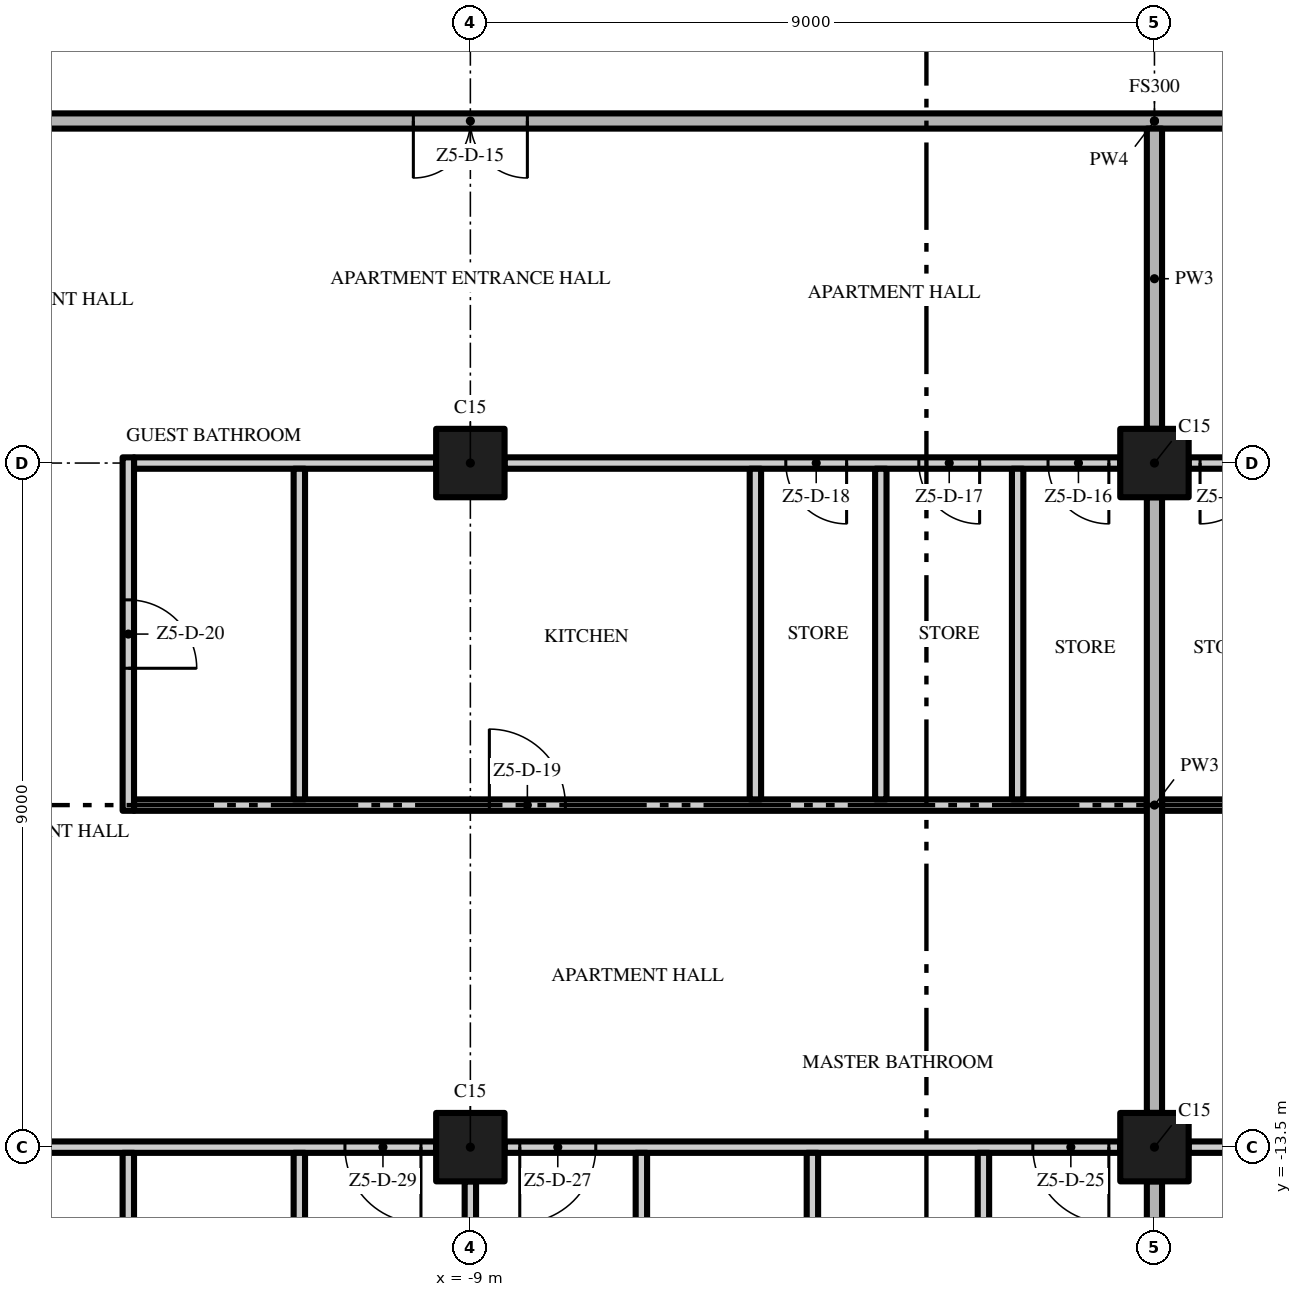
"""IFC4 building model, lengths in metres.
Left out: names, types, materials, properties, quantities, classifications, styles, units other than length and angle.
Written with IfcOpenShell. Run it as: python <this file> out.ifc"""

import sys

from ifc_helpers import new_model, si_unit, direction, frame, frame_2d, origin, origin_2d, place, context, subcontext, project, spatial, rectangle, extrude, element, fill, save


model = new_model("IFC4")
c1 = context("Model", 3, precision=1e-05, world=origin(), true_north=direction((0.0, 1.0)))
c2 = subcontext(c1, "Body", "Model", "MODEL_VIEW")
j1 = project(units=[si_unit("LENGTHUNIT", "METRE"), si_unit("PLANEANGLEUNIT", "RADIAN")], contexts=[c1])
p1 = place(None, origin())
s1 = spatial("IfcSite", under=j1, at=p1, CompositionType="ELEMENT")
p2 = place(p1, origin())
s2 = spatial("IfcBuilding", under=s1, at=p2, CompositionType="ELEMENT")
p3 = place(p2, frame((0.0, 0.0, 280.6)))
s3 = spatial("IfcBuildingStorey", under=s2, at=p3, CompositionType="ELEMENT", Elevation=280.6)
for number, where, z_axis, x_axis in (
    (1, (-9.0, -13.5, 0.0), (0.0, 0.0, 1.0), (1.0, 0.0, 0.0)),
    (2, (-9.0, -4.5, 0.0), (0.0, 0.0, 1.0), (1.0, 0.0, 0.0)),
    (3, (0.0, -13.5, 0.0), (0.0, 0.0, 1.0), (1.0, 0.0, 0.0)),
    (4, (0.0, -4.5, 0.0), (0.0, 0.0, 1.0), (1.0, 0.0, 0.0)),
):
    element("IfcColumn", number, at=place(p3, frame(where, z_axis=z_axis, x_axis=x_axis)), inside=s3, PredefinedType="COLUMN", context=c2, shape_type="SweptSolid", body=[
        extrude(rectangle(XDim=0.9, YDim=0.9, at=origin_2d()), origin(), (0.0, 0.0, 1.0), 3.5),
    ])
p4 = place(p3, frame((-9.45, -13.5, 0.0), z_axis=(0.0, 0.0, 1.0), x_axis=(-1.0, 0.0, 0.0)))
e5 = element("IfcWall", 5, at=p4, inside=s3, PredefinedType="PARTITIONING", context=c2, shape_type="SweptSolid", body=[
    extrude(rectangle(XDim=8.1, YDim=0.15, at=frame_2d((4.05, 0.0))), origin(), (0.0, 0.0, 1.0), 3.5),
])
p5 = place(p4, frame((0.2, 0.0, 0.0)))
e6 = element("IfcOpeningElement", 6, at=p5, cuts=e5, PredefinedType="OPENING", context=c2, shape_type="SweptSolid", body=[
    extrude(rectangle(XDim=1.0, YDim=2.4, at=frame_2d((0.5, 1.2))), frame((0.0, 0.085, 0.0), z_axis=(0.0, -1.0, 0.0), x_axis=(1.0, 0.0, 0.0)), (0.0, 0.0, 1.0), 0.17),
])
p6 = place(p4, frame((5.8, 0.0, 0.0)))
e7 = element("IfcOpeningElement", 7, at=p6, cuts=e5, PredefinedType="OPENING", context=c2, shape_type="SweptSolid", body=[
    extrude(rectangle(XDim=1.0, YDim=2.4, at=frame_2d((0.5, 1.2))), frame((0.0, 0.085, 0.0), z_axis=(0.0, -1.0, 0.0), x_axis=(1.0, 0.0, 0.0)), (0.0, 0.0, 1.0), 0.17),
])
p7 = place(p3, frame((-0.45, -13.5, 0.0), z_axis=(0.0, 0.0, 1.0), x_axis=(-1.0, 0.0, 0.0)))
e8 = element("IfcWall", 8, at=p7, inside=s3, PredefinedType="PARTITIONING", context=c2, shape_type="SweptSolid", body=[
    extrude(rectangle(XDim=8.1, YDim=0.15, at=frame_2d((4.05, 0.0))), origin(), (0.0, 0.0, 1.0), 3.5),
])
p8 = place(p7, frame((0.15, 0.0, 0.0)))
e9 = element("IfcOpeningElement", 9, at=p8, cuts=e8, PredefinedType="OPENING", context=c2, shape_type="SweptSolid", body=[
    extrude(rectangle(XDim=1.0, YDim=2.4, at=frame_2d((0.5, 1.2))), frame((0.0, 0.085, 0.0), z_axis=(0.0, -1.0, 0.0), x_axis=(1.0, 0.0, 0.0)), (0.0, 0.0, 1.0), 0.17),
])
p9 = place(p7, frame((6.9, 0.0, 0.0)))
e10 = element("IfcOpeningElement", 10, at=p9, cuts=e8, PredefinedType="OPENING", context=c2, shape_type="SweptSolid", body=[
    extrude(rectangle(XDim=1.0, YDim=2.4, at=frame_2d((0.5, 1.2))), frame((0.0, 0.085, 0.0), z_axis=(0.0, -1.0, 0.0), x_axis=(1.0, 0.0, 0.0)), (0.0, 0.0, 1.0), 0.17),
])
p10 = place(p3, frame((8.55, -13.5, 0.0), z_axis=(0.0, 0.0, 1.0), x_axis=(-1.0, 0.0, 0.0)))
e11 = element("IfcWall", 11, at=p10, inside=s3, PredefinedType="PARTITIONING", context=c2, shape_type="SweptSolid", body=[
    extrude(rectangle(XDim=8.1, YDim=0.15, at=frame_2d((4.05, 0.0))), origin(), (0.0, 0.0, 1.0), 3.5),
])
p11 = place(p10, frame((0.2, 0.0, 0.0)))
e12 = element("IfcOpeningElement", 12, at=p11, cuts=e11, PredefinedType="OPENING", context=c2, shape_type="SweptSolid", body=[
    extrude(rectangle(XDim=1.0, YDim=2.4, at=frame_2d((0.5, 1.2))), frame((0.0, 0.085, 0.0), z_axis=(0.0, -1.0, 0.0), x_axis=(1.0, 0.0, 0.0)), (0.0, 0.0, 1.0), 0.17),
])
p12 = place(p10, frame((5.8, 0.0, 0.0)))
e13 = element("IfcOpeningElement", 13, at=p12, cuts=e11, PredefinedType="OPENING", context=c2, shape_type="SweptSolid", body=[
    extrude(rectangle(XDim=1.0, YDim=2.4, at=frame_2d((0.5, 1.2))), frame((0.0, 0.085, 0.0), z_axis=(0.0, -1.0, 0.0), x_axis=(1.0, 0.0, 0.0)), (0.0, 0.0, 1.0), 0.17),
])
p13 = place(p3, frame((-13.425, -9.0, 0.0), z_axis=(0.0, 0.0, 1.0), x_axis=(1.0, 0.0, 0.0)))
e14 = element("IfcWall", 14, at=p13, inside=s3, PredefinedType="PARTITIONING", context=c2, shape_type="SweptSolid", body=[
    extrude(rectangle(XDim=13.325, YDim=0.15, at=frame_2d((6.662, 0.0))), origin(), (0.0, 0.0, 1.0), 3.5),
])
p14 = place(p13, frame((4.675, 0.0, 0.0)))
e15 = element("IfcOpeningElement", 15, at=p14, cuts=e14, PredefinedType="OPENING", context=c2, shape_type="SweptSolid", body=[
    extrude(rectangle(XDim=1.0, YDim=2.4, at=frame_2d((0.5, 1.2))), frame((0.0, 0.085, 0.0), z_axis=(0.0, -1.0, 0.0), x_axis=(1.0, 0.0, 0.0)), (0.0, 0.0, 1.0), 0.17),
])
p15 = place(p3, frame((0.1, -9.0, 0.0), z_axis=(0.0, 0.0, 1.0), x_axis=(1.0, 0.0, 0.0)))
e16 = element("IfcWall", 16, at=p15, inside=s3, PredefinedType="PARTITIONING", context=c2, shape_type="SweptSolid", body=[
    extrude(rectangle(XDim=13.4, YDim=0.15, at=frame_2d((6.7, 0.0))), origin(), (0.0, 0.0, 1.0), 3.5),
])
p16 = place(p15, frame((11.2, 0.0, 0.0)))
e17 = element("IfcOpeningElement", 17, at=p16, cuts=e16, PredefinedType="OPENING", context=c2, shape_type="SweptSolid", body=[
    extrude(rectangle(XDim=0.8, YDim=2.0, at=frame_2d((0.4, 1.0))), frame((0.0, 0.085, 0.0), z_axis=(0.0, -1.0, 0.0), x_axis=(1.0, 0.0, 0.0)), (0.0, 0.0, 1.0), 0.17),
])
p17 = place(p15, frame((8.55, 0.0, 0.0)))
e18 = element("IfcOpeningElement", 18, at=p17, cuts=e16, PredefinedType="OPENING", context=c2, shape_type="SweptSolid", body=[
    extrude(rectangle(XDim=0.8, YDim=2.0, at=frame_2d((0.4, 1.0))), frame((0.0, 0.085, 0.0), z_axis=(0.0, -1.0, 0.0), x_axis=(1.0, 0.0, 0.0)), (0.0, 0.0, 1.0), 0.17),
])
p18 = place(p15, frame((5.8, 0.0, 0.0)))
e19 = element("IfcOpeningElement", 19, at=p18, cuts=e16, PredefinedType="OPENING", context=c2, shape_type="SweptSolid", body=[
    extrude(rectangle(XDim=0.8, YDim=2.0, at=frame_2d((0.4, 1.0))), frame((0.0, 0.085, 0.0), z_axis=(0.0, -1.0, 0.0), x_axis=(1.0, 0.0, 0.0)), (0.0, 0.0, 1.0), 0.17),
])
p19 = place(p3, frame((-13.425, -4.5, 0.0), z_axis=(0.0, 0.0, 1.0), x_axis=(1.0, 0.0, 0.0)))
e20 = element("IfcWall", 20, at=p19, inside=s3, PredefinedType="PARTITIONING", context=c2, shape_type="SweptSolid", body=[
    extrude(rectangle(XDim=3.975, YDim=0.15, at=frame_2d((1.988, 0.0))), origin(), (0.0, 0.0, 1.0), 3.5),
])
p20 = place(p3, frame((-0.45, -4.5, 0.0), z_axis=(0.0, 0.0, 1.0), x_axis=(-1.0, 0.0, 0.0)))
e21 = element("IfcWall", 21, at=p20, inside=s3, PredefinedType="PARTITIONING", context=c2, shape_type="SweptSolid", body=[
    extrude(rectangle(XDim=8.1, YDim=0.15, at=frame_2d((4.05, 0.0))), origin(), (0.0, 0.0, 1.0), 3.5),
])
p21 = place(p20, frame((0.15, 0.0, 0.0)))
e22 = element("IfcOpeningElement", 22, at=p21, cuts=e21, PredefinedType="OPENING", context=c2, shape_type="SweptSolid", body=[
    extrude(rectangle(XDim=0.8, YDim=2.0, at=frame_2d((0.4, 1.0))), frame((0.0, 0.085, 0.0), z_axis=(0.0, -1.0, 0.0), x_axis=(1.0, 0.0, 0.0)), (0.0, 0.0, 1.0), 0.17),
])
p22 = place(p20, frame((1.85, 0.0, 0.0)))
e23 = element("IfcOpeningElement", 23, at=p22, cuts=e21, PredefinedType="OPENING", context=c2, shape_type="SweptSolid", body=[
    extrude(rectangle(XDim=0.8, YDim=2.0, at=frame_2d((0.4, 1.0))), frame((0.0, 0.085, 0.0), z_axis=(0.0, -1.0, 0.0), x_axis=(1.0, 0.0, 0.0)), (0.0, 0.0, 1.0), 0.17),
])
p23 = place(p20, frame((3.6, 0.0, 0.0)))
e24 = element("IfcOpeningElement", 24, at=p23, cuts=e21, PredefinedType="OPENING", context=c2, shape_type="SweptSolid", body=[
    extrude(rectangle(XDim=0.8, YDim=2.0, at=frame_2d((0.4, 1.0))), frame((0.0, 0.085, 0.0), z_axis=(0.0, -1.0, 0.0), x_axis=(1.0, 0.0, 0.0)), (0.0, 0.0, 1.0), 0.17),
])
p24 = place(p3, frame((8.55, -4.5, 0.0), z_axis=(0.0, 0.0, 1.0), x_axis=(-1.0, 0.0, 0.0)))
e25 = element("IfcWall", 25, at=p24, inside=s3, PredefinedType="PARTITIONING", context=c2, shape_type="SweptSolid", body=[
    extrude(rectangle(XDim=8.1, YDim=0.15, at=frame_2d((4.05, 0.0))), origin(), (0.0, 0.0, 1.0), 3.5),
])
p25 = place(p24, frame((4.8, 0.0, 0.0)))
e26 = element("IfcOpeningElement", 26, at=p25, cuts=e25, PredefinedType="OPENING", context=c2, shape_type="SweptSolid", body=[
    extrude(rectangle(XDim=0.9, YDim=2.1, at=frame_2d((0.45, 1.05))), frame((0.0, 0.085, 0.0), z_axis=(0.0, -1.0, 0.0), x_axis=(1.0, 0.0, 0.0)), (0.0, 0.0, 1.0), 0.17),
])
p26 = place(p24, frame((7.15, 0.0, 0.0)))
e27 = element("IfcOpeningElement", 27, at=p26, cuts=e25, PredefinedType="OPENING", context=c2, shape_type="SweptSolid", body=[
    extrude(rectangle(XDim=0.8, YDim=2.0, at=frame_2d((0.4, 1.0))), frame((0.0, 0.085, 0.0), z_axis=(0.0, -1.0, 0.0), x_axis=(1.0, 0.0, 0.0)), (0.0, 0.0, 1.0), 0.17),
])
p27 = place(p3, frame((17.4, 0.0, 0.0), z_axis=(0.0, 0.0, 1.0), x_axis=(-1.0, 0.0, 0.0)))
e28 = element("IfcWall", 28, at=p27, inside=s3, PredefinedType="PARTITIONING", context=c2, shape_type="SweptSolid", body=[
    extrude(rectangle(XDim=34.8, YDim=0.2, at=frame_2d((17.4, 0.0))), origin(), (0.0, 0.0, 1.0), 3.5),
])
p28 = place(p27, frame((25.65, 0.0, 0.0)))
e29 = element("IfcOpeningElement", 29, at=p28, cuts=e28, PredefinedType="OPENING", context=c2, shape_type="SweptSolid", body=[
    extrude(rectangle(XDim=1.5, YDim=2.4, at=frame_2d((0.75, 1.2))), frame((0.0, 0.11, 0.0), z_axis=(0.0, -1.0, 0.0), x_axis=(1.0, 0.0, 0.0)), (0.0, 0.0, 1.0), 0.22),
])
p29 = place(p27, frame((7.65, 0.0, 0.0)))
e30 = element("IfcOpeningElement", 30, at=p29, cuts=e28, PredefinedType="OPENING", context=c2, shape_type="SweptSolid", body=[
    extrude(rectangle(XDim=1.5, YDim=2.4, at=frame_2d((0.75, 1.2))), frame((0.0, 0.11, 0.0), z_axis=(0.0, -1.0, 0.0), x_axis=(1.0, 0.0, 0.0)), (0.0, 0.0, 1.0), 0.22),
])
p30 = place(p3, frame((-13.5, -22.2, 0.0), z_axis=(0.0, 0.0, 1.0), x_axis=(0.0, 1.0, 0.0)))
e31 = element("IfcWall", 31, at=p30, inside=s3, PredefinedType="PARTITIONING", context=c2, shape_type="SweptSolid", body=[
    extrude(rectangle(XDim=8.625, YDim=0.15, at=frame_2d((4.312, 0.0))), origin(), (0.0, 0.0, 1.0), 3.5),
])
p31 = place(p3, frame((-13.5, -4.425, 0.0), z_axis=(0.0, 0.0, 1.0), x_axis=(0.0, -1.0, 0.0)))
e32 = element("IfcWall", 32, at=p31, inside=s3, PredefinedType="PARTITIONING", context=c2, shape_type="SweptSolid", body=[
    extrude(rectangle(XDim=4.65, YDim=0.15, at=frame_2d((2.325, 0.0))), origin(), (0.0, 0.0, 1.0), 3.5),
])
p32 = place(p31, frame((1.875, 0.0, 0.0)))
e33 = element("IfcOpeningElement", 33, at=p32, cuts=e32, PredefinedType="OPENING", context=c2, shape_type="SweptSolid", body=[
    extrude(rectangle(XDim=0.9, YDim=2.1, at=frame_2d((0.45, 1.05))), frame((0.0, 0.085, 0.0), z_axis=(0.0, -1.0, 0.0), x_axis=(1.0, 0.0, 0.0)), (0.0, 0.0, 1.0), 0.17),
])
p33 = place(p3, frame((-11.25, -16.575, 0.0), z_axis=(0.0, 0.0, 1.0), x_axis=(0.0, 1.0, 0.0)))
e34 = element("IfcWall", 34, at=p33, inside=s3, PredefinedType="PARTITIONING", context=c2, shape_type="SweptSolid", body=[
    extrude(rectangle(XDim=3.0, YDim=0.15, at=frame_2d((1.5, 0.0))), origin(), (0.0, 0.0, 1.0), 3.5),
])
p34 = place(p3, frame((-11.25, -8.925, 0.0), z_axis=(0.0, 0.0, 1.0), x_axis=(0.0, 1.0, 0.0)))
e35 = element("IfcWall", 35, at=p34, inside=s3, PredefinedType="PARTITIONING", context=c2, shape_type="SweptSolid", body=[
    extrude(rectangle(XDim=4.35, YDim=0.15, at=frame_2d((2.175, 0.0))), origin(), (0.0, 0.0, 1.0), 3.5),
])
p35 = place(p3, frame((-9.0, -21.6, 0.0), z_axis=(0.0, 0.0, 1.0), x_axis=(0.0, 1.0, 0.0)))
e36 = element("IfcWall", 36, at=p35, inside=s3, PredefinedType="PARTITIONING", context=c2, shape_type="SweptSolid", body=[
    extrude(rectangle(XDim=7.65, YDim=0.15, at=frame_2d((3.825, 0.0))), origin(), (0.0, 0.0, 1.0), 3.5),
])
p36 = place(p3, frame((-6.75, -16.575, 0.0), z_axis=(0.0, 0.0, 1.0), x_axis=(0.0, 1.0, 0.0)))
e37 = element("IfcWall", 37, at=p36, inside=s3, PredefinedType="PARTITIONING", context=c2, shape_type="SweptSolid", body=[
    extrude(rectangle(XDim=3.0, YDim=0.15, at=frame_2d((1.5, 0.0))), origin(), (0.0, 0.0, 1.0), 3.5),
])
p37 = place(p3, frame((-5.25, -8.925, 0.0), z_axis=(0.0, 0.0, 1.0), x_axis=(0.0, 1.0, 0.0)))
e38 = element("IfcWall", 38, at=p37, inside=s3, PredefinedType="PARTITIONING", context=c2, shape_type="SweptSolid", body=[
    extrude(rectangle(XDim=4.35, YDim=0.15, at=frame_2d((2.175, 0.0))), origin(), (0.0, 0.0, 1.0), 3.5),
])
p38 = place(p3, frame((-4.5, -22.2, 0.0), z_axis=(0.0, 0.0, 1.0), x_axis=(0.0, 1.0, 0.0)))
e39 = element("IfcWall", 39, at=p38, inside=s3, PredefinedType="PARTITIONING", context=c2, shape_type="SweptSolid", body=[
    extrude(rectangle(XDim=8.625, YDim=0.15, at=frame_2d((4.312, 0.0))), origin(), (0.0, 0.0, 1.0), 3.5),
])
p39 = place(p3, frame((-3.6, -8.925, 0.0), z_axis=(0.0, 0.0, 1.0), x_axis=(0.0, 1.0, 0.0)))
e40 = element("IfcWall", 40, at=p39, inside=s3, PredefinedType="PARTITIONING", context=c2, shape_type="SweptSolid", body=[
    extrude(rectangle(XDim=4.35, YDim=0.15, at=frame_2d((2.175, 0.0))), origin(), (0.0, 0.0, 1.0), 3.5),
])
p40 = place(p3, frame((-2.25, -16.575, 0.0), z_axis=(0.0, 0.0, 1.0), x_axis=(0.0, 1.0, 0.0)))
e41 = element("IfcWall", 41, at=p40, inside=s3, PredefinedType="PARTITIONING", context=c2, shape_type="SweptSolid", body=[
    extrude(rectangle(XDim=3.0, YDim=0.15, at=frame_2d((1.5, 0.0))), origin(), (0.0, 0.0, 1.0), 3.5),
])
p41 = place(p3, frame((-1.8, -8.925, 0.0), z_axis=(0.0, 0.0, 1.0), x_axis=(0.0, 1.0, 0.0)))
e42 = element("IfcWall", 42, at=p41, inside=s3, PredefinedType="PARTITIONING", context=c2, shape_type="SweptSolid", body=[
    extrude(rectangle(XDim=4.35, YDim=0.15, at=frame_2d((2.175, 0.0))), origin(), (0.0, 0.0, 1.0), 3.5),
])
p42 = place(p3, frame((0.0, -21.6, 0.0), z_axis=(0.0, 0.0, 1.0), x_axis=(0.0, 1.0, 0.0)))
e43 = element("IfcWall", 43, at=p42, inside=s3, PredefinedType="PARTITIONING", context=c2, shape_type="SweptSolid", body=[
    extrude(rectangle(XDim=7.65, YDim=0.2, at=frame_2d((3.825, 0.0))), origin(), (0.0, 0.0, 1.0), 3.5),
])
p43 = place(p3, frame((0.0, -13.05, 0.0), z_axis=(0.0, 0.0, 1.0), x_axis=(0.0, 1.0, 0.0)))
e44 = element("IfcWall", 44, at=p43, inside=s3, PredefinedType="PARTITIONING", context=c2, shape_type="SweptSolid", body=[
    extrude(rectangle(XDim=8.1, YDim=0.2, at=frame_2d((4.05, 0.0))), origin(), (0.0, 0.0, 1.0), 3.5),
])
p44 = place(p3, frame((0.0, -4.05, 0.0), z_axis=(0.0, 0.0, 1.0), x_axis=(0.0, 1.0, 0.0)))
e45 = element("IfcWall", 45, at=p44, inside=s3, PredefinedType="PARTITIONING", context=c2, shape_type="SweptSolid", body=[
    extrude(rectangle(XDim=3.95, YDim=0.2, at=frame_2d((1.975, 0.0))), origin(), (0.0, 0.0, 1.0), 3.5),
])
p45 = place(p28, origin())
e46 = element("IfcDoor", 46, at=p45, inside=s3, OperationType="DOUBLE_DOOR_SINGLE_SWING", PredefinedType="DOOR", context=c2, shape_type="SweptSolid", body=[
    extrude(rectangle(XDim=1.5, YDim=2.4, at=frame_2d((0.75, 1.2))), frame((0.0, 0.025, 0.0), z_axis=(0.0, -1.0, 0.0), x_axis=(1.0, 0.0, 0.0)), (0.0, 0.0, 1.0), 0.05),
])
fill(e29, e46)
p46 = place(p21, origin())
e47 = element("IfcDoor", 47, at=p46, inside=s3, OperationType="SINGLE_SWING_LEFT", PredefinedType="DOOR", context=c2, shape_type="SweptSolid", body=[
    extrude(rectangle(XDim=0.8, YDim=2.0, at=frame_2d((0.4, 1.0))), frame((0.0, 0.025, 0.0), z_axis=(0.0, -1.0, 0.0), x_axis=(1.0, 0.0, 0.0)), (0.0, 0.0, 1.0), 0.05),
])
fill(e22, e47)
p47 = place(p22, origin())
e48 = element("IfcDoor", 48, at=p47, inside=s3, OperationType="SINGLE_SWING_LEFT", PredefinedType="DOOR", context=c2, shape_type="SweptSolid", body=[
    extrude(rectangle(XDim=0.8, YDim=2.0, at=frame_2d((0.4, 1.0))), frame((0.0, 0.025, 0.0), z_axis=(0.0, -1.0, 0.0), x_axis=(1.0, 0.0, 0.0)), (0.0, 0.0, 1.0), 0.05),
])
fill(e23, e48)
p48 = place(p23, origin())
e49 = element("IfcDoor", 49, at=p48, inside=s3, OperationType="SINGLE_SWING_LEFT", PredefinedType="DOOR", context=c2, shape_type="SweptSolid", body=[
    extrude(rectangle(XDim=0.8, YDim=2.0, at=frame_2d((0.4, 1.0))), frame((0.0, 0.025, 0.0), z_axis=(0.0, -1.0, 0.0), x_axis=(1.0, 0.0, 0.0)), (0.0, 0.0, 1.0), 0.05),
])
fill(e24, e49)
p49 = place(p14, origin())
e50 = element("IfcDoor", 50, at=p49, inside=s3, OperationType="SINGLE_SWING_LEFT", PredefinedType="DOOR", context=c2, shape_type="SweptSolid", body=[
    extrude(rectangle(XDim=1.0, YDim=2.4, at=frame_2d((0.5, 1.2))), frame((0.0, 0.025, 0.0), z_axis=(0.0, -1.0, 0.0), x_axis=(1.0, 0.0, 0.0)), (0.0, 0.0, 1.0), 0.05),
])
fill(e15, e50)
p50 = place(p32, origin())
e51 = element("IfcDoor", 51, at=p50, inside=s3, OperationType="SINGLE_SWING_RIGHT", PredefinedType="DOOR", context=c2, shape_type="SweptSolid", body=[
    extrude(rectangle(XDim=0.9, YDim=2.1, at=frame_2d((0.45, 1.05))), frame((0.0, 0.025, 0.0), z_axis=(0.0, -1.0, 0.0), x_axis=(1.0, 0.0, 0.0)), (0.0, 0.0, 1.0), 0.05),
])
fill(e33, e51)
p51 = place(p8, origin())
e52 = element("IfcDoor", 52, at=p51, inside=s3, OperationType="SINGLE_SWING_LEFT", PredefinedType="DOOR", context=c2, shape_type="SweptSolid", body=[
    extrude(rectangle(XDim=1.0, YDim=2.4, at=frame_2d((0.5, 1.2))), frame((0.0, 0.025, 0.0), z_axis=(0.0, -1.0, 0.0), x_axis=(1.0, 0.0, 0.0)), (0.0, 0.0, 1.0), 0.05),
])
fill(e9, e52)
p52 = place(p9, origin())
e53 = element("IfcDoor", 53, at=p52, inside=s3, OperationType="SINGLE_SWING_RIGHT", PredefinedType="DOOR", context=c2, shape_type="SweptSolid", body=[
    extrude(rectangle(XDim=1.0, YDim=2.4, at=frame_2d((0.5, 1.2))), frame((0.0, 0.025, 0.0), z_axis=(0.0, -1.0, 0.0), x_axis=(1.0, 0.0, 0.0)), (0.0, 0.0, 1.0), 0.05),
])
fill(e10, e53)
p53 = place(p5, origin())
e54 = element("IfcDoor", 54, at=p53, inside=s3, OperationType="SINGLE_SWING_LEFT", PredefinedType="DOOR", context=c2, shape_type="SweptSolid", body=[
    extrude(rectangle(XDim=1.0, YDim=2.4, at=frame_2d((0.5, 1.2))), frame((0.0, 0.025, 0.0), z_axis=(0.0, -1.0, 0.0), x_axis=(1.0, 0.0, 0.0)), (0.0, 0.0, 1.0), 0.05),
])
fill(e6, e54)
p54 = place(p26, origin())
e55 = element("IfcDoor", 55, at=p54, inside=s3, OperationType="SINGLE_SWING_RIGHT", PredefinedType="DOOR", context=c2, shape_type="SweptSolid", body=[
    extrude(rectangle(XDim=0.8, YDim=2.0, at=frame_2d((0.4, 1.0))), frame((0.0, 0.025, 0.0), z_axis=(0.0, -1.0, 0.0), x_axis=(1.0, 0.0, 0.0)), (0.0, 0.0, 1.0), 0.05),
])
fill(e27, e55)
save(model, sys.argv[1])
